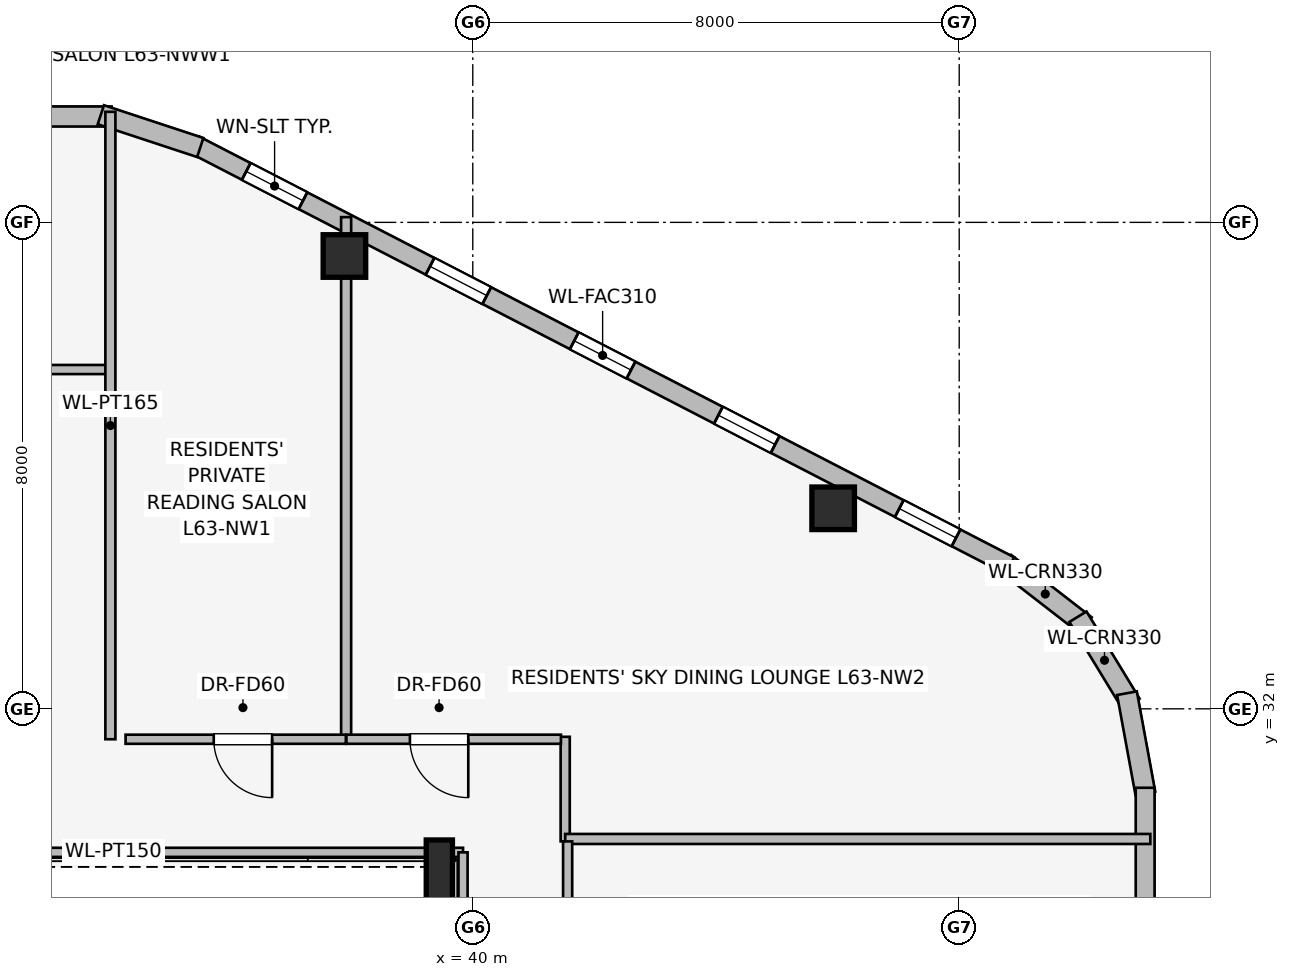
"""IFC4 building model, lengths in metres.
Left out: names, types, materials, properties, quantities, classifications, styles, units other than length and angle.
Written with IfcOpenShell. Run it as: python <this file> out.ifc"""

import sys

from ifc_helpers import new_model, si_unit, direction, frame, frame_2d, origin, origin_2d, place, context, subcontext, project, spatial, rectangle, i_section, extrude, element, fill, save


model = new_model("IFC4")
c1 = context("Model", 3, precision=1e-05, world=origin(), true_north=direction((0.0, 1.0)))
c2 = subcontext(c1, "Body", "Model", "MODEL_VIEW")
j1 = project(units=[si_unit("LENGTHUNIT", "METRE"), si_unit("PLANEANGLEUNIT", "RADIAN")], contexts=[c1])
p1 = place(None, origin())
s1 = spatial("IfcSite", under=j1, at=p1, CompositionType="ELEMENT")
p2 = place(p1, origin())
s2 = spatial("IfcBuilding", under=s1, at=p2, CompositionType="ELEMENT")
p3 = place(p2, frame((0.0, 0.0, 231.25)))
s3 = spatial("IfcBuildingStorey", under=s2, at=p3, CompositionType="ELEMENT", Elevation=231.25)
for number, where, z_axis, x_axis in (
    (1, (45.927, 35.298, 0.0), (0.0, 0.0, 1.0), (1.0, 0.0, 0.0)),
    (2, (37.889, 39.447, 0.0), (0.0, 0.0, 1.0), (1.0, 0.0, 0.0)),
):
    element("IfcColumn", number, at=place(p3, frame(where, z_axis=z_axis, x_axis=x_axis)), inside=s3, PredefinedType="COLUMN", context=c2, shape_type="SweptSolid", body=[
        extrude(rectangle(XDim=0.7, YDim=0.7, at=origin_2d()), origin(), (0.0, 0.0, 1.0), 3.55),
    ])
p4 = place(p3, frame((39.45, 29.35, 0.0), z_axis=(0.0, 0.0, 1.0), x_axis=(1.0, 0.0, 0.0)))
e3 = element("IfcColumn", 3, at=p4, inside=s3, PredefinedType="COLUMN", context=c2, shape_type="SweptSolid", body=[
    extrude(i_section(OverallWidth=0.431, OverallDepth=0.987, WebThickness=0.034, FlangeThickness=0.062, at=origin_2d()), origin(), (0.0, 0.0, 1.0), 3.55),
])
p5 = place(p3, frame((48.753, 34.401, 0.0), z_axis=(0.0, 0.0, 1.0), x_axis=(0.790691856293, -0.61221433207, 0.0)))
e4 = element("IfcWall", 4, at=p5, inside=s3, PredefinedType="STANDARD", context=c2, shape_type="SweptSolid", body=[
    extrude(rectangle(XDim=1.676, YDim=0.33, at=frame_2d((0.838, 0.0))), origin(), (0.0, 0.0, 1.0), 3.26),
])
p6 = place(p3, frame((49.953, 33.515, 0.0), z_axis=(0.0, 0.0, 1.0), x_axis=(0.520325409202, -0.853968072318, 0.0)))
e5 = element("IfcWall", 5, at=p6, inside=s3, PredefinedType="STANDARD", context=c2, shape_type="SweptSolid", body=[
    extrude(rectangle(XDim=1.678, YDim=0.33, at=frame_2d((0.839, 0.0))), origin(), (0.0, 0.0, 1.0), 3.26),
])
p7 = place(p3, frame((50.759, 32.257, 0.0), z_axis=(0.0, 0.0, 1.0), x_axis=(0.180691763044, -0.983539773862, 0.0)))
e6 = element("IfcWall", 6, at=p7, inside=s3, PredefinedType="STANDARD", context=c2, shape_type="SweptSolid", body=[
    extrude(rectangle(XDim=1.677, YDim=0.33, at=frame_2d((0.838, 0.0))), origin(), (0.0, 0.0, 1.0), 3.26),
])
p8 = place(p3, frame((35.437, 41.27, 0.0), z_axis=(0.0, 0.0, 1.0), x_axis=(0.888581481622, -0.458718814218, 0.0)))
e7 = element("IfcWall", 7, at=p8, inside=s3, PredefinedType="STANDARD", context=c2, shape_type="SweptSolid", body=[
    extrude(rectangle(XDim=15.077, YDim=0.31, at=frame_2d((7.539, 0.0))), origin(), (0.0, 0.0, 1.0), 3.26),
])
p9 = place(p8, frame((0.942, 0.0, 0.75)))
e8 = element("IfcOpeningElement", 8, at=p9, cuts=e7, PredefinedType="OPENING", context=c2, shape_type="SweptSolid", body=[
    extrude(rectangle(XDim=1.05, YDim=1.4, at=frame_2d((0.525, 0.7))), frame((0.0, 0.165, 0.0), z_axis=(0.0, -1.0, 0.0), x_axis=(1.0, 0.0, 0.0)), (0.0, 0.0, 1.0), 0.33),
])
p10 = place(p8, frame((4.344, 0.0, 0.75)))
e9 = element("IfcOpeningElement", 9, at=p10, cuts=e7, PredefinedType="OPENING", context=c2, shape_type="SweptSolid", body=[
    extrude(rectangle(XDim=1.05, YDim=1.4, at=frame_2d((0.525, 0.7))), frame((0.0, 0.165, 0.0), z_axis=(0.0, -1.0, 0.0), x_axis=(1.0, 0.0, 0.0)), (0.0, 0.0, 1.0), 0.33),
])
p11 = place(p8, frame((7.013, 0.0, 0.75)))
e10 = element("IfcOpeningElement", 10, at=p11, cuts=e7, PredefinedType="OPENING", context=c2, shape_type="SweptSolid", body=[
    extrude(rectangle(XDim=1.05, YDim=1.4, at=frame_2d((0.525, 0.7))), frame((0.0, 0.165, 0.0), z_axis=(0.0, -1.0, 0.0), x_axis=(1.0, 0.0, 0.0)), (0.0, 0.0, 1.0), 0.33),
])
p12 = place(p8, frame((9.681, 0.0, 0.75)))
e11 = element("IfcOpeningElement", 11, at=p12, cuts=e7, PredefinedType="OPENING", context=c2, shape_type="SweptSolid", body=[
    extrude(rectangle(XDim=1.05, YDim=1.4, at=frame_2d((0.525, 0.7))), frame((0.0, 0.165, 0.0), z_axis=(0.0, -1.0, 0.0), x_axis=(1.0, 0.0, 0.0)), (0.0, 0.0, 1.0), 0.33),
])
p13 = place(p8, frame((13.029, 0.0, 0.75)))
e12 = element("IfcOpeningElement", 12, at=p13, cuts=e7, PredefinedType="OPENING", context=c2, shape_type="SweptSolid", body=[
    extrude(rectangle(XDim=1.05, YDim=1.4, at=frame_2d((0.525, 0.7))), frame((0.0, 0.165, 0.0), z_axis=(0.0, -1.0, 0.0), x_axis=(1.0, 0.0, 0.0)), (0.0, 0.0, 1.0), 0.33),
])
p14 = place(p3, frame((32.339, 41.741, 0.0), z_axis=(0.0, 0.0, 1.0), x_axis=(1.0, 0.0, 0.0)))
e13 = element("IfcWall", 13, at=p14, inside=s3, PredefinedType="STANDARD", context=c2, shape_type="SweptSolid", body=[
    extrude(rectangle(XDim=1.722, YDim=0.33, at=frame_2d((0.861, 0.0))), origin(), (0.0, 0.0, 1.0), 3.26),
])
p15 = place(p3, frame((33.883, 41.77, 0.0), z_axis=(0.0, 0.0, 1.0), x_axis=(0.949713440491, -0.313120393699, 0.0)))
e14 = element("IfcWall", 14, at=p15, inside=s3, PredefinedType="STANDARD", context=c2, shape_type="SweptSolid", body=[
    extrude(rectangle(XDim=1.722, YDim=0.33, at=frame_2d((0.861, 0.0))), origin(), (0.0, 0.0, 1.0), 3.26),
])
p16 = place(p3, frame((51.058, 30.702, 0.0), z_axis=(0.0, 0.0, 1.0), x_axis=(0.0, -1.0, 0.0)))
e15 = element("IfcWall", 15, at=p16, inside=s3, PredefinedType="STANDARD", context=c2, shape_type="SweptSolid", body=[
    extrude(rectangle(XDim=13.404, YDim=0.31, at=frame_2d((6.702, 0.0))), origin(), (0.0, 0.0, 1.0), 3.26),
])
p17 = place(p16, frame((5.386, 0.0, 0.75)))
e16 = element("IfcOpeningElement", 16, at=p17, cuts=e15, PredefinedType="OPENING", context=c2, shape_type="SweptSolid", body=[
    extrude(rectangle(XDim=2.4, YDim=1.6, at=frame_2d((1.2, 0.8))), frame((0.0, 0.165, 0.0), z_axis=(0.0, -1.0, 0.0), x_axis=(1.0, 0.0, 0.0)), (0.0, 0.0, 1.0), 0.33),
])
p18 = place(p16, frame((9.04, 0.0, 0.75)))
e17 = element("IfcOpeningElement", 17, at=p18, cuts=e15, PredefinedType="OPENING", context=c2, shape_type="SweptSolid", body=[
    extrude(rectangle(XDim=1.05, YDim=1.4, at=frame_2d((0.525, 0.7))), frame((0.0, 0.165, 0.0), z_axis=(0.0, -1.0, 0.0), x_axis=(1.0, 0.0, 0.0)), (0.0, 0.0, 1.0), 0.33),
])
p19 = place(p3, frame((39.84, 29.64, 0.0), z_axis=(0.0, 0.0, 1.0), x_axis=(-1.0, 0.0, 0.0)))
e18 = element("IfcWall", 18, at=p19, inside=s3, PredefinedType="PARTITIONING", context=c2, shape_type="SweptSolid", body=[
    extrude(rectangle(XDim=12.203, YDim=0.15, at=frame_2d((6.102, 0.0))), origin(), (0.0, 0.0, 1.0), 2.401),
])
p20 = place(p3, frame((39.84, 18.36, 0.0), z_axis=(0.0, 0.0, 1.0), x_axis=(0.0, 1.0, 0.0)))
e19 = element("IfcWall", 19, at=p20, inside=s3, PredefinedType="PARTITIONING", context=c2, shape_type="SweptSolid", body=[
    extrude(rectangle(XDim=11.28, YDim=0.15, at=frame_2d((5.64, 0.0))), origin(), (0.0, 0.0, 1.0), 3.26),
])
p21 = place(p3, frame((34.0, 37.58, 0.0), z_axis=(0.0, 0.0, 1.0), x_axis=(-1.0, 0.0, 0.0)))
e20 = element("IfcWall", 20, at=p21, inside=s3, PredefinedType="PARTITIONING", context=c2, shape_type="SweptSolid", body=[
    extrude(rectangle(XDim=10.501, YDim=0.15, at=frame_2d((5.25, 0.0))), origin(), (0.0, 0.0, 1.0), 2.652),
])
p22 = place(p21, frame((4.879, 0.0, 0.0)))
e21 = element("IfcOpeningElement", 21, at=p22, cuts=e20, PredefinedType="OPENING", context=c2, shape_type="SweptSolid", body=[
    extrude(rectangle(XDim=0.96, YDim=2.0, at=frame_2d((0.48, 1.0))), frame((0.0, 0.085, 0.0), z_axis=(0.0, -1.0, 0.0), x_axis=(1.0, 0.0, 0.0)), (0.0, 0.0, 1.0), 0.17),
])
p23 = place(p3, frame((34.04, 31.5, 0.0), z_axis=(0.0, 0.0, 1.0), x_axis=(0.0, 1.0, 0.0)))
e22 = element("IfcWall", 22, at=p23, inside=s3, PredefinedType="PARTITIONING", context=c2, shape_type="SweptSolid", body=[
    extrude(rectangle(XDim=10.318, YDim=0.165, at=frame_2d((5.159, 0.0))), origin(), (0.0, 0.0, 1.0), 3.26),
])
p24 = place(p3, frame((41.52, 29.82, 0.0), z_axis=(0.0, 0.0, 1.0), x_axis=(0.0, 1.0, 0.0)))
e23 = element("IfcWall", 23, at=p24, inside=s3, PredefinedType="PARTITIONING", context=c2, shape_type="SweptSolid", body=[
    extrude(rectangle(XDim=1.72, YDim=0.15, at=frame_2d((0.86, 0.0))), origin(), (0.0, 0.0, 1.0), 3.26),
])
p25 = place(p3, frame((37.917, 31.51, 0.0), z_axis=(0.0, 0.0, 1.0), x_axis=(0.0, 1.0, 0.0)))
e24 = element("IfcWall", 24, at=p25, inside=s3, PredefinedType="PARTITIONING", context=c2, shape_type="SweptSolid", body=[
    extrude(rectangle(XDim=8.576, YDim=0.165, at=frame_2d((4.288, 0.0))), origin(), (0.0, 0.0, 1.0), 2.649),
])
p26 = place(p3, frame((37.912, 31.5, 0.0), z_axis=(0.0, 0.0, 1.0), x_axis=(-1.0, 0.0, 0.0)))
e25 = element("IfcWall", 25, at=p26, inside=s3, PredefinedType="PARTITIONING", context=c2, shape_type="SweptSolid", body=[
    extrude(rectangle(XDim=3.622, YDim=0.15, at=frame_2d((1.811, 0.0))), origin(), (0.0, 0.0, 1.0), 3.26),
])
p27 = place(p26, frame((1.212, 0.0, 0.0)))
e26 = element("IfcOpeningElement", 26, at=p27, cuts=e25, PredefinedType="OPENING", context=c2, shape_type="SweptSolid", body=[
    extrude(rectangle(XDim=0.96, YDim=2.0, at=frame_2d((0.48, 1.0))), frame((0.0, 0.085, 0.0), z_axis=(0.0, -1.0, 0.0), x_axis=(1.0, 0.0, 0.0)), (0.0, 0.0, 1.0), 0.17),
])
p28 = place(p3, frame((41.45, 31.5, 0.0), z_axis=(0.0, 0.0, 1.0), x_axis=(-1.0, 0.0, 0.0)))
e27 = element("IfcWall", 27, at=p28, inside=s3, PredefinedType="PARTITIONING", context=c2, shape_type="SweptSolid", body=[
    extrude(rectangle(XDim=3.528, YDim=0.15, at=frame_2d((1.764, 0.0))), origin(), (0.0, 0.0, 1.0), 3.26),
])
p29 = place(p28, frame((1.524, 0.0, 0.0)))
e28 = element("IfcOpeningElement", 28, at=p29, cuts=e27, PredefinedType="OPENING", context=c2, shape_type="SweptSolid", body=[
    extrude(rectangle(XDim=0.96, YDim=2.0, at=frame_2d((0.48, 1.0))), frame((0.0, 0.085, 0.0), z_axis=(0.0, -1.0, 0.0), x_axis=(1.0, 0.0, 0.0)), (0.0, 0.0, 1.0), 0.17),
])
p30 = place(p3, frame((41.52, 29.86, 0.0), z_axis=(0.0, 0.0, 1.0), x_axis=(1.0, 0.0, 0.0)))
e29 = element("IfcWall", 29, at=p30, inside=s3, PredefinedType="PARTITIONING", context=c2, shape_type="SweptSolid", body=[
    extrude(rectangle(XDim=9.623, YDim=0.165, at=frame_2d((4.812, 0.0))), origin(), (0.0, 0.0, 1.0), 3.26),
])
p31 = place(p3, frame((41.56, 26.113, 0.0), z_axis=(0.0, 0.0, 1.0), x_axis=(0.0, 1.0, 0.0)))
e30 = element("IfcWall", 30, at=p31, inside=s3, PredefinedType="PARTITIONING", context=c2, shape_type="SweptSolid", body=[
    extrude(rectangle(XDim=3.707, YDim=0.15, at=frame_2d((1.854, 0.0))), origin(), (0.0, 0.0, 1.0), 3.26),
])
p32 = place(p31, frame((1.374, 0.0, 0.0)))
e31 = element("IfcOpeningElement", 31, at=p32, cuts=e30, PredefinedType="OPENING", context=c2, shape_type="SweptSolid", body=[
    extrude(rectangle(XDim=0.96, YDim=2.0, at=frame_2d((0.48, 1.0))), frame((0.0, 0.085, 0.0), z_axis=(0.0, -1.0, 0.0), x_axis=(1.0, 0.0, 0.0)), (0.0, 0.0, 1.0), 0.17),
])
p33 = place(p9, origin())
e32 = element("IfcWindow", 32, at=p33, inside=s3, PartitioningType="SINGLE_PANEL", PredefinedType="WINDOW", context=c2, shape_type="SweptSolid", body=[
    extrude(rectangle(XDim=1.05, YDim=1.4, at=frame_2d((0.525, 0.7))), frame((0.0, 0.03, 0.0), z_axis=(0.0, -1.0, 0.0), x_axis=(1.0, 0.0, 0.0)), (0.0, 0.0, 1.0), 0.06),
])
fill(e8, e32)
p34 = place(p10, origin())
e33 = element("IfcWindow", 33, at=p34, inside=s3, PartitioningType="SINGLE_PANEL", PredefinedType="WINDOW", context=c2, shape_type="SweptSolid", body=[
    extrude(rectangle(XDim=1.05, YDim=1.4, at=frame_2d((0.525, 0.7))), frame((0.0, 0.03, 0.0), z_axis=(0.0, -1.0, 0.0), x_axis=(1.0, 0.0, 0.0)), (0.0, 0.0, 1.0), 0.06),
])
fill(e9, e33)
p35 = place(p11, origin())
e34 = element("IfcWindow", 34, at=p35, inside=s3, PartitioningType="SINGLE_PANEL", PredefinedType="WINDOW", context=c2, shape_type="SweptSolid", body=[
    extrude(rectangle(XDim=1.05, YDim=1.4, at=frame_2d((0.525, 0.7))), frame((0.0, 0.03, 0.0), z_axis=(0.0, -1.0, 0.0), x_axis=(1.0, 0.0, 0.0)), (0.0, 0.0, 1.0), 0.06),
])
fill(e10, e34)
p36 = place(p12, origin())
e35 = element("IfcWindow", 35, at=p36, inside=s3, PartitioningType="SINGLE_PANEL", PredefinedType="WINDOW", context=c2, shape_type="SweptSolid", body=[
    extrude(rectangle(XDim=1.05, YDim=1.4, at=frame_2d((0.525, 0.7))), frame((0.0, 0.03, 0.0), z_axis=(0.0, -1.0, 0.0), x_axis=(1.0, 0.0, 0.0)), (0.0, 0.0, 1.0), 0.06),
])
fill(e11, e35)
p37 = place(p13, origin())
e36 = element("IfcWindow", 36, at=p37, inside=s3, PartitioningType="SINGLE_PANEL", PredefinedType="WINDOW", context=c2, shape_type="SweptSolid", body=[
    extrude(rectangle(XDim=1.05, YDim=1.4, at=frame_2d((0.525, 0.7))), frame((0.0, 0.03, 0.0), z_axis=(0.0, -1.0, 0.0), x_axis=(1.0, 0.0, 0.0)), (0.0, 0.0, 1.0), 0.06),
])
fill(e12, e36)
p38 = place(p27, origin())
e37 = element("IfcDoor", 37, at=p38, inside=s3, OperationType="SINGLE_SWING_LEFT", PredefinedType="DOOR", context=c2, shape_type="SweptSolid", body=[
    extrude(rectangle(XDim=0.96, YDim=2.0, at=frame_2d((0.48, 1.0))), frame((0.0, 0.025, 0.0), z_axis=(0.0, -1.0, 0.0), x_axis=(1.0, 0.0, 0.0)), (0.0, 0.0, 1.0), 0.05),
])
fill(e26, e37)
p39 = place(p29, origin())
e38 = element("IfcDoor", 38, at=p39, inside=s3, OperationType="SINGLE_SWING_LEFT", PredefinedType="DOOR", context=c2, shape_type="SweptSolid", body=[
    extrude(rectangle(XDim=0.96, YDim=2.0, at=frame_2d((0.48, 1.0))), frame((0.0, 0.025, 0.0), z_axis=(0.0, -1.0, 0.0), x_axis=(1.0, 0.0, 0.0)), (0.0, 0.0, 1.0), 0.05),
])
fill(e28, e38)
save(model, sys.argv[1])
